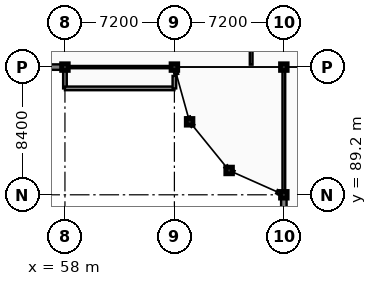
"""IFC4 building model, lengths in metres.
Left out: names, types, materials, properties, quantities, classifications, styles, units other than length and angle.
Written with IfcOpenShell. Run it as: python <this file> out.ifc"""

import sys

from ifc_helpers import new_model, si_unit, direction, frame, frame_2d, origin, origin_2d, place, context, subcontext, project, spatial, rectangle, extrude, element, fill, save


model = new_model("IFC4")
c1 = context("Model", 3, precision=1e-05, world=origin(), true_north=direction((0.0, 1.0)))
c2 = subcontext(c1, "Body", "Model", "MODEL_VIEW")
j1 = project(units=[si_unit("LENGTHUNIT", "METRE"), si_unit("PLANEANGLEUNIT", "RADIAN")], contexts=[c1])
p1 = place(None, origin())
s1 = spatial("IfcSite", under=j1, at=p1, CompositionType="ELEMENT")
p2 = place(p1, origin())
s2 = spatial("IfcBuilding", under=s1, at=p2, CompositionType="ELEMENT")
p3 = place(p2, frame((0.0, 0.0, 5.4)))
s3 = spatial("IfcBuildingStorey", under=s2, at=p3, CompositionType="ELEMENT", Elevation=5.4)
for number, where, z_axis, x_axis in (
    (1, (58.0, 97.6, 0.0), (0.0, 0.0, 1.0), (1.0, 0.0, 0.0)),
    (2, (65.2, 97.6, 0.0), (0.0, 0.0, 1.0), (1.0, 0.0, 0.0)),
    (3, (66.2, 94.0, 0.0), (0.0, 0.0, 1.0), (1.0, 0.0, 0.0)),
    (4, (68.8, 90.8, 0.0), (0.0, 0.0, 1.0), (1.0, 0.0, 0.0)),
    (5, (72.4, 89.2, 0.0), (0.0, 0.0, 1.0), (1.0, 0.0, 0.0)),
    (6, (72.4, 97.6, 0.0), (0.0, 0.0, 1.0), (1.0, 0.0, 0.0)),
):
    element("IfcColumn", number, at=place(p3, frame(where, z_axis=z_axis, x_axis=x_axis)), inside=s3, PredefinedType="COLUMN", context=c2, shape_type="SweptSolid", body=[
        extrude(rectangle(XDim=0.44, YDim=0.44, at=origin_2d()), origin(), (0.0, 0.0, 1.0), 4.2),
    ])
p4 = place(p3, frame((58.0, 97.6, 0.0), z_axis=(0.0, 0.0, 1.0), x_axis=(1.0, 0.0, 0.0)))
e7 = element("IfcWall", 7, at=p4, inside=s3, PredefinedType="PARTITIONING", context=c2, shape_type="SweptSolid", body=[
    extrude(rectangle(XDim=7.2, YDim=0.15, at=frame_2d((3.6, 0.0))), origin(), (0.0, 0.0, 1.0), 3.37),
])
p5 = place(p4, frame((3.1, 0.0, -0.01)))
e8 = element("IfcOpeningElement", 8, at=p5, cuts=e7, PredefinedType="OPENING", context=c2, shape_type="SweptSolid", body=[
    extrude(rectangle(XDim=1.0, YDim=2.16, at=frame_2d((0.5, 1.08))), frame((0.0, 0.085, 0.0), z_axis=(0.0, -1.0, 0.0), x_axis=(1.0, 0.0, 0.0)), (0.0, 0.0, 1.0), 0.17),
])
p6 = place(p3, frame((70.25, 97.76, 0.0), z_axis=(0.0, 0.0, 1.0), x_axis=(0.0, 1.0, 0.0)))
e9 = element("IfcWall", 9, at=p6, inside=s3, PredefinedType="PARTITIONING", context=c2, shape_type="SweptSolid", body=[
    extrude(rectangle(XDim=4.19, YDim=0.18, at=frame_2d((2.095, 0.0))), origin(), (0.0, 0.0, 1.0), 3.52),
])
p7 = place(p3, frame((72.4, 89.2, 0.0), z_axis=(0.0, 0.0, 1.0), x_axis=(0.0, 1.0, 0.0)))
e10 = element("IfcWall", 10, at=p7, inside=s3, PredefinedType="PARTITIONING", context=c2, shape_type="SweptSolid", body=[
    extrude(rectangle(XDim=8.4, YDim=0.18, at=frame_2d((4.2, 0.0))), origin(), (0.0, 0.0, 1.0), 3.25),
])
p8 = place(p7, frame((3.4, 0.0, -0.01)))
e11 = element("IfcOpeningElement", 11, at=p8, cuts=e10, PredefinedType="OPENING", context=c2, shape_type="SweptSolid", body=[
    extrude(rectangle(XDim=1.6, YDim=2.21, at=frame_2d((0.8, 1.105))), frame((0.0, 0.1, 0.0), z_axis=(0.0, -1.0, 0.0), x_axis=(1.0, 0.0, 0.0)), (0.0, 0.0, 1.0), 0.2),
])
p9 = place(p3, frame((50.8, 97.6, 0.0), z_axis=(0.0, 0.0, 1.0), x_axis=(1.0, 0.0, 0.0)))
e12 = element("IfcWall", 12, at=p9, inside=s3, PredefinedType="SOLIDWALL", context=c2, shape_type="SweptSolid", body=[
    extrude(rectangle(XDim=7.2, YDim=0.36, at=frame_2d((3.6, 0.0))), origin(), (0.0, 0.0, 1.0), 3.37),
])
p10 = place(p9, frame((0.46, 0.0, 0.75)))
e13 = element("IfcOpeningElement", 13, at=p10, cuts=e12, PredefinedType="OPENING", context=c2, shape_type="SweptSolid", body=[
    extrude(rectangle(XDim=1.55, YDim=2.45, at=frame_2d((0.775, 1.225))), frame((0.0, 0.19, 0.0), z_axis=(0.0, -1.0, 0.0), x_axis=(1.0, 0.0, 0.0)), (0.0, 0.0, 1.0), 0.38),
])
p11 = place(p9, frame((5.06, 0.0, 0.75)))
e14 = element("IfcOpeningElement", 14, at=p11, cuts=e12, PredefinedType="OPENING", context=c2, shape_type="SweptSolid", body=[
    extrude(rectangle(XDim=1.55, YDim=2.45, at=frame_2d((0.775, 1.225))), frame((0.0, 0.19, 0.0), z_axis=(0.0, -1.0, 0.0), x_axis=(1.0, 0.0, 0.0)), (0.0, 0.0, 1.0), 0.38),
])
p12 = place(p3, frame((72.4, 89.2, 0.0), z_axis=(0.0, 0.0, 1.0), x_axis=(0.0, -1.0, 0.0)))
e15 = element("IfcWall", 15, at=p12, inside=s3, PredefinedType="SOLIDWALL", context=c2, shape_type="SweptSolid", body=[
    extrude(rectangle(XDim=8.4, YDim=0.36, at=frame_2d((4.2, 0.0))), origin(), (0.0, 0.0, 1.0), 3.25),
])
p13 = place(p12, frame((0.46, 0.0, 0.75)))
e16 = element("IfcOpeningElement", 16, at=p13, cuts=e15, PredefinedType="OPENING", context=c2, shape_type="SweptSolid", body=[
    extrude(rectangle(XDim=1.55, YDim=2.36, at=frame_2d((0.775, 1.18))), frame((0.0, 0.19, 0.0), z_axis=(0.0, -1.0, 0.0), x_axis=(1.0, 0.0, 0.0)), (0.0, 0.0, 1.0), 0.38),
])
p14 = place(p12, frame((6.26, 0.0, 0.75)))
e17 = element("IfcOpeningElement", 17, at=p14, cuts=e15, PredefinedType="OPENING", context=c2, shape_type="SweptSolid", body=[
    extrude(rectangle(XDim=1.55, YDim=2.36, at=frame_2d((0.775, 1.18))), frame((0.0, 0.19, 0.0), z_axis=(0.0, -1.0, 0.0), x_axis=(1.0, 0.0, 0.0)), (0.0, 0.0, 1.0), 0.38),
])
p15 = place(p3, frame((65.275, 97.33, 0.0), z_axis=(0.0, 0.0, 1.0), x_axis=(0.267529355044, -0.963549710285, 0.0)))
e18 = element("IfcWall", 18, at=p15, inside=s3, PredefinedType="SOLIDWALL", context=c2, shape_type="SweptSolid", body=[
    extrude(rectangle(XDim=0.22, YDim=0.24, at=frame_2d((0.11, 0.0))), origin(), (0.0, 0.0, 1.0), 3.52),
])
for number, where, z_axis, x_axis in (
    (19, (66.109, 94.328, 0.0), (0.0, 0.0, 1.0), (0.268, -0.963, 0.0)),
    (20, (66.2, 94.0, 0.0), (0.0, 0.0, 1.0), (0.63, -0.776, 0.0)),
    (21, (68.586, 91.064, 0.0), (0.0, 0.0, 1.0), (0.63, -0.776, 0.0)),
):
    element("IfcWall", number, at=place(p3, frame(where, z_axis=z_axis, x_axis=x_axis)), inside=s3, PredefinedType="SOLIDWALL", context=c2, shape_type="SweptSolid", body=[
        extrude(rectangle(XDim=0.34, YDim=0.24, at=frame_2d((0.17, 0.0))), origin(), (0.0, 0.0, 1.0), 3.52),
    ])
p16 = place(p3, frame((68.8, 90.8, 0.0), z_axis=(0.0, 0.0, 1.0), x_axis=(0.913633745955, -0.406538286329, 0.0)))
e22 = element("IfcWall", 22, at=p16, inside=s3, PredefinedType="SOLIDWALL", context=c2, shape_type="SweptSolid", body=[
    extrude(rectangle(XDim=0.34, YDim=0.24, at=frame_2d((0.17, 0.0))), origin(), (0.0, 0.0, 1.0), 3.52),
])
p17 = place(p3, frame((71.943, 89.403, 0.0), z_axis=(0.0, 0.0, 1.0), x_axis=(0.913719959968, -0.406344477944, 0.0)))
e23 = element("IfcWall", 23, at=p17, inside=s3, PredefinedType="SOLIDWALL", context=c2, shape_type="SweptSolid", body=[
    extrude(rectangle(XDim=0.22, YDim=0.24, at=frame_2d((0.11, 0.0))), origin(), (0.0, 0.0, 1.0), 3.52),
])
p18 = place(p3, frame((58.0, 97.45, 0.0), z_axis=(0.0, 0.0, 1.0), x_axis=(0.0, -1.0, 0.0)))
e24 = element("IfcWall", 24, at=p18, inside=s3, PredefinedType="SOLIDWALL", context=c2, shape_type="SweptSolid", body=[
    extrude(rectangle(XDim=1.25, YDim=0.24, at=frame_2d((0.625, 0.0))), origin(), (0.0, 0.0, 1.0), 3.37),
])
p19 = place(p3, frame((58.0, 96.2, 0.0), z_axis=(0.0, 0.0, 1.0), x_axis=(1.0, 0.0, 0.0)))
e25 = element("IfcWall", 25, at=p19, inside=s3, PredefinedType="SOLIDWALL", context=c2, shape_type="SweptSolid", body=[
    extrude(rectangle(XDim=7.2, YDim=0.24, at=frame_2d((3.6, 0.0))), origin(), (0.0, 0.0, 1.0), 3.37),
])
p20 = place(p19, frame((0.46, 0.0, 0.65)))
e26 = element("IfcOpeningElement", 26, at=p20, cuts=e25, PredefinedType="OPENING", context=c2, shape_type="SweptSolid", body=[
    extrude(rectangle(XDim=2.4, YDim=2.25, at=frame_2d((1.2, 1.125))), frame((0.0, 0.13, 0.0), z_axis=(0.0, -1.0, 0.0), x_axis=(1.0, 0.0, 0.0)), (0.0, 0.0, 1.0), 0.26),
])
p21 = place(p19, frame((4.26, 0.0, 0.65)))
e27 = element("IfcOpeningElement", 27, at=p21, cuts=e25, PredefinedType="OPENING", context=c2, shape_type="SweptSolid", body=[
    extrude(rectangle(XDim=2.4, YDim=2.25, at=frame_2d((1.2, 1.125))), frame((0.0, 0.13, 0.0), z_axis=(0.0, -1.0, 0.0), x_axis=(1.0, 0.0, 0.0)), (0.0, 0.0, 1.0), 0.26),
])
p22 = place(p3, frame((65.2, 96.2, 0.0), z_axis=(0.0, 0.0, 1.0), x_axis=(0.0, 1.0, 0.0)))
e28 = element("IfcWall", 28, at=p22, inside=s3, PredefinedType="SOLIDWALL", context=c2, shape_type="SweptSolid", body=[
    extrude(rectangle(XDim=0.82, YDim=0.24, at=frame_2d((0.41, 0.0))), origin(), (0.0, 0.0, 1.0), 3.37),
])
p23 = place(p5, frame((1.0, 0.0, 0.01), z_axis=(0.0, 0.0, 1.0), x_axis=(-1.0, 0.0, 0.0)))
e29 = element("IfcDoor", 29, at=p23, inside=s3, OperationType="SINGLE_SWING_LEFT", PredefinedType="DOOR", context=c2, shape_type="SweptSolid", body=[
    extrude(rectangle(XDim=1.0, YDim=2.15, at=frame_2d((0.5, 1.075))), frame((0.0, 0.025, 0.0), z_axis=(0.0, -1.0, 0.0), x_axis=(1.0, 0.0, 0.0)), (0.0, 0.0, 1.0), 0.05),
])
fill(e8, e29)
p24 = place(p8, frame((0.0, 0.0, 0.01)))
e30 = element("IfcDoor", 30, at=p24, inside=s3, OperationType="DOUBLE_SWING_LEFT", PredefinedType="DOOR", context=c2, shape_type="SweptSolid", body=[
    extrude(rectangle(XDim=1.6, YDim=2.2, at=frame_2d((0.8, 1.1))), frame((0.0, 0.025, 0.0), z_axis=(0.0, -1.0, 0.0), x_axis=(1.0, 0.0, 0.0)), (0.0, 0.0, 1.0), 0.05),
])
fill(e11, e30)
p25 = place(p11, origin())
e31 = element("IfcWindow", 31, at=p25, inside=s3, PartitioningType="DOUBLE_PANEL_HORIZONTAL", PredefinedType="WINDOW", context=c2, shape_type="SweptSolid", body=[
    extrude(rectangle(XDim=1.55, YDim=2.45, at=frame_2d((0.775, 1.225))), frame((0.0, 0.03, 0.0), z_axis=(0.0, -1.0, 0.0), x_axis=(1.0, 0.0, 0.0)), (0.0, 0.0, 1.0), 0.06),
])
fill(e14, e31)
p26 = place(p13, origin())
e32 = element("IfcWindow", 32, at=p26, inside=s3, PartitioningType="DOUBLE_PANEL_HORIZONTAL", PredefinedType="WINDOW", context=c2, shape_type="SweptSolid", body=[
    extrude(rectangle(XDim=1.55, YDim=2.36, at=frame_2d((0.775, 1.18))), frame((0.0, 0.03, 0.0), z_axis=(0.0, -1.0, 0.0), x_axis=(1.0, 0.0, 0.0)), (0.0, 0.0, 1.0), 0.06),
])
fill(e16, e32)
p27 = place(p20, origin())
e33 = element("IfcWindow", 33, at=p27, inside=s3, PartitioningType="TRIPLE_PANEL_VERTICAL", PredefinedType="WINDOW", context=c2, shape_type="SweptSolid", body=[
    extrude(rectangle(XDim=2.4, YDim=2.25, at=frame_2d((1.2, 1.125))), frame((0.0, 0.03, 0.0), z_axis=(0.0, -1.0, 0.0), x_axis=(1.0, 0.0, 0.0)), (0.0, 0.0, 1.0), 0.06),
])
fill(e26, e33)
p28 = place(p21, origin())
e34 = element("IfcWindow", 34, at=p28, inside=s3, PartitioningType="TRIPLE_PANEL_VERTICAL", PredefinedType="WINDOW", context=c2, shape_type="SweptSolid", body=[
    extrude(rectangle(XDim=2.4, YDim=2.25, at=frame_2d((1.2, 1.125))), frame((0.0, 0.03, 0.0), z_axis=(0.0, -1.0, 0.0), x_axis=(1.0, 0.0, 0.0)), (0.0, 0.0, 1.0), 0.06),
])
fill(e27, e34)
save(model, sys.argv[1])
